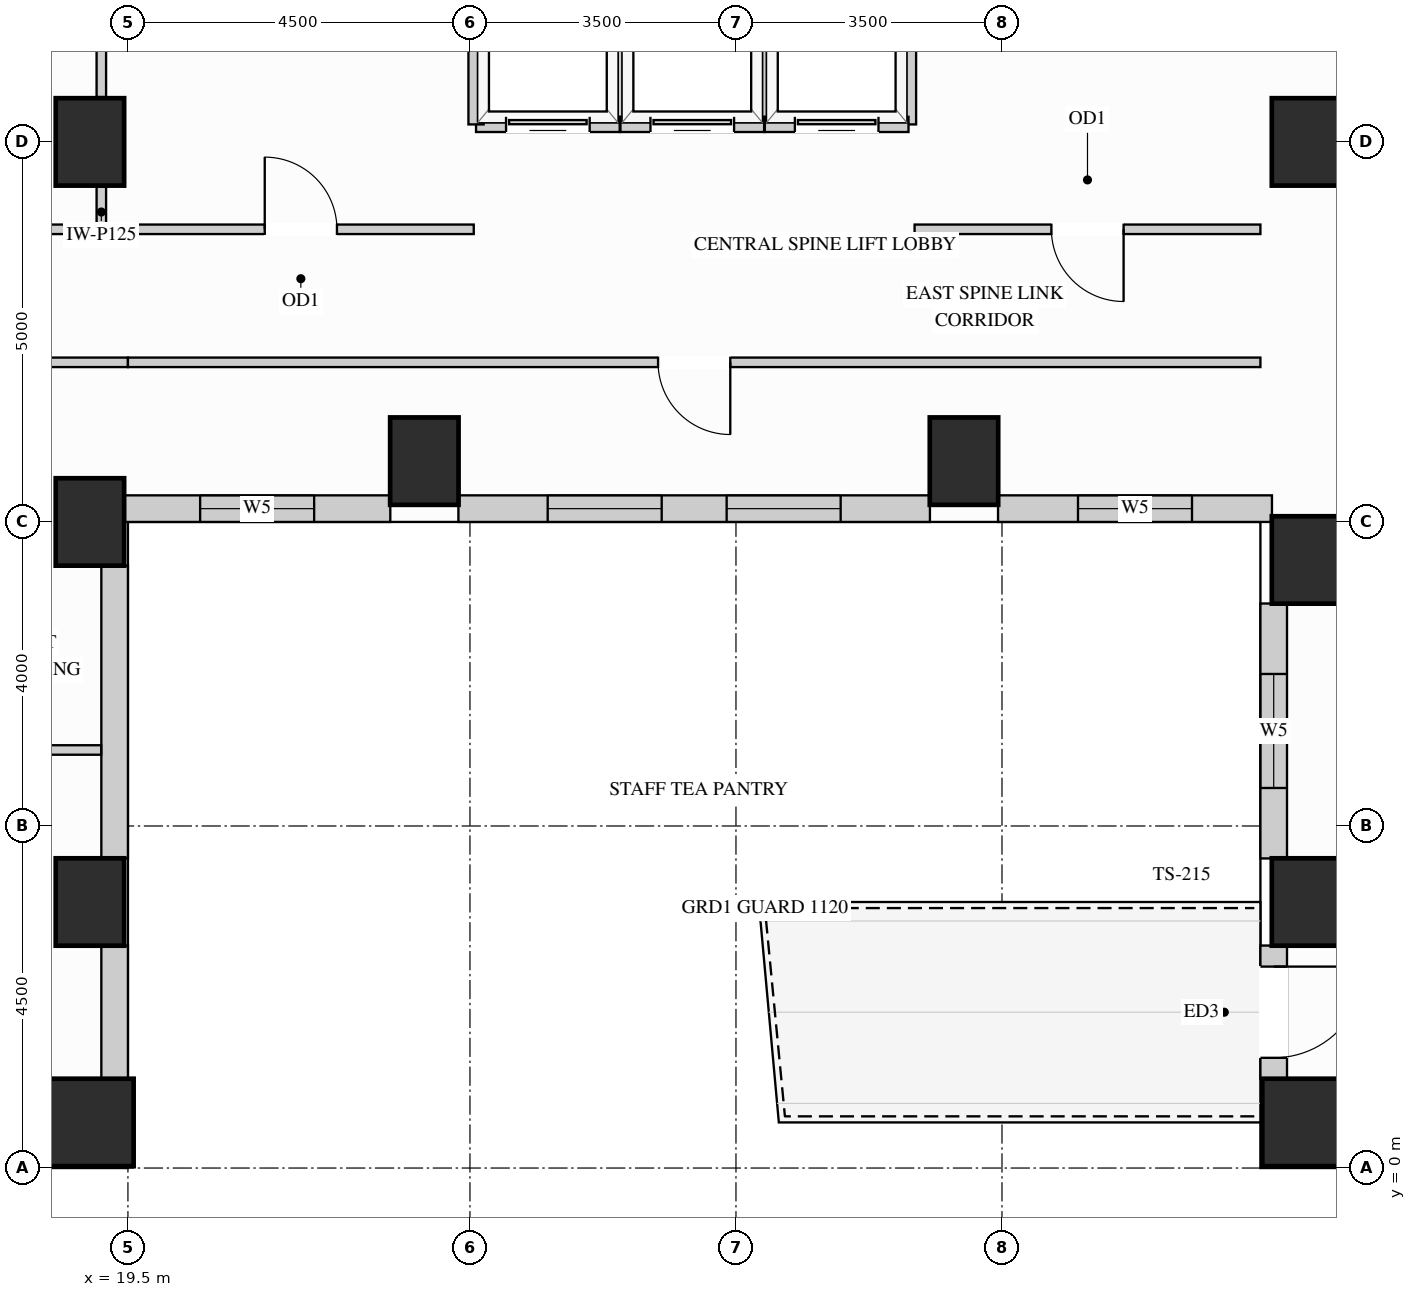
"""IFC4 building model, lengths in metres.
Left out: names, types, materials, properties, quantities, classifications, styles, units other than length and angle.
Written with IfcOpenShell. Run it as: python <this file> out.ifc"""

import sys

from ifc_helpers import new_model, si_unit, direction, frame, frame_2d, origin, origin_2d, place, context, subcontext, project, spatial, rectangle, extrude, source, transform, mapped, element, fill, save


model = new_model("IFC4")
c1 = context("Model", 3, precision=1e-05, world=origin(), true_north=direction((0.0, 1.0)))
c2 = subcontext(c1, "Body", "Model", "MODEL_VIEW")
j1 = project(units=[si_unit("LENGTHUNIT", "METRE"), si_unit("PLANEANGLEUNIT", "RADIAN")], contexts=[c1])
p1 = place(None, origin())
s1 = spatial("IfcSite", under=j1, at=p1, CompositionType="ELEMENT")
p2 = place(p1, origin())
s2 = spatial("IfcBuilding", under=s1, at=p2, CompositionType="ELEMENT")
p3 = place(p2, frame((0.0, 0.0, 106.2)))
s3 = spatial("IfcBuildingStorey", under=s2, at=p3, CompositionType="ELEMENT", Elevation=106.2)
m1 = source(origin(), c2, "Body", "SweptSolid", [
    extrude(rectangle(XDim=0.9, YDim=1.15, at=origin_2d()), origin(), (0.0, 0.0, 1.0), 3.38),
])
for number, where, z_axis, x_axis in (
    (1, (19.0, 13.5, 0.0), (0.0, 0.0, 1.0), (1.0, 0.0, 0.0)),
    (2, (19.0, 3.5, 0.0), (0.0, 0.0, 1.0), (1.0, 0.0, 0.0)),
    (3, (19.0, 8.5, 0.0), (0.0, 0.0, 1.0), (1.0, 0.0, 0.0)),
    (4, (35.0, 13.5, 0.0), (0.0, 0.0, 1.0), (1.0, 0.0, 0.0)),
    (5, (35.0, 3.5, 0.0), (0.0, 0.0, 1.0), (1.0, 0.0, 0.0)),
    (6, (35.0, 8.0, 0.0), (0.0, 0.0, 1.0), (1.0, 0.0, 0.0)),
    (7, (23.4, 9.3, 0.0), (0.0, 0.0, 1.0), (1.0, 0.0, 0.0)),
    (8, (30.5, 9.3, 0.0), (0.0, 0.0, 1.0), (1.0, 0.0, 0.0)),
):
    element("IfcColumn", number, at=place(p3, frame(where, z_axis=z_axis, x_axis=x_axis)), inside=s3, PredefinedType="COLUMN", context=c2, shape_type="MappedRepresentation", body=[
        mapped(m1, transform((0.0, 0.0, 0.0), x_axis=(1.0, 0.0, 0.0), y_axis=(0.0, 1.0, 0.0), z_axis=(0.0, 0.0, 1.0))),
    ])
m2 = source(origin(), c2, "Body", "SweptSolid", [
    extrude(rectangle(XDim=1.15, YDim=1.15, at=origin_2d()), origin(), (0.0, 0.0, 1.0), 3.38),
])
for number, where, z_axis, x_axis in (
    (9, (19.0, 0.6, 0.0), (0.0, 0.0, 1.0), (1.0, 0.0, 0.0)),
    (10, (35.0, 0.6, 0.0), (0.0, 0.0, 1.0), (1.0, 0.0, 0.0)),
):
    element("IfcColumn", number, at=place(p3, frame(where, z_axis=z_axis, x_axis=x_axis)), inside=s3, PredefinedType="COLUMN", context=c2, shape_type="MappedRepresentation", body=[
        mapped(m2, transform((0.0, 0.0, 0.0), x_axis=(1.0, 0.0, 0.0), y_axis=(0.0, 1.0, 0.0), z_axis=(0.0, 0.0, 1.0))),
    ])
m3 = source(origin(), c2, "Body", "SweptSolid", [
    extrude(rectangle(XDim=1.754, YDim=0.35, at=frame_2d((0.877, 0.0))), origin(), (0.0, 0.0, 1.0), 2.519),
])
p4 = place(p3, frame((19.325, 1.173, 0.0), z_axis=(0.0, 0.0, 1.0), x_axis=(0.0, 1.0, 0.0)))
e11 = element("IfcWall", 11, at=p4, inside=s3, PredefinedType="SOLIDWALL", context=c2, shape_type="MappedRepresentation", body=[
    mapped(m3, transform((0.0, 0.0, 0.0), x_axis=(1.0, 0.0, 0.0), y_axis=(0.0, 1.0, 0.0), z_axis=(0.0, 0.0, 1.0))),
])
m4 = source(origin(), c2, "Body", "SweptSolid", [
    extrude(rectangle(XDim=3.854, YDim=0.35, at=frame_2d((1.927, 0.0))), origin(), (0.0, 0.0, 1.0), 2.519),
])
p5 = place(p3, frame((19.325, 4.073, 0.0), z_axis=(0.0, 0.0, 1.0), x_axis=(0.0, 1.0, 0.0)))
e12 = element("IfcWall", 12, at=p5, inside=s3, PredefinedType="SOLIDWALL", context=c2, shape_type="MappedRepresentation", body=[
    mapped(m4, transform((0.0, 0.0, 0.0), x_axis=(1.0, 0.0, 0.0), y_axis=(0.0, 1.0, 0.0), z_axis=(0.0, 0.0, 1.0))),
])
p6 = place(p3, frame((19.448, 8.675, 0.0), z_axis=(0.0, 0.0, 1.0), x_axis=(1.0, 0.0, 0.0)))
e13 = element("IfcWall", 13, at=p6, inside=s3, PredefinedType="SOLIDWALL", context=c2, shape_type="SweptSolid", body=[
    extrude(rectangle(XDim=3.504, YDim=0.35, at=frame_2d((1.752, 0.0))), origin(), (0.0, 0.0, 1.0), 3.365),
])
p7 = place(p6, frame((1.002, 0.0, 0.78)))
e14 = element("IfcOpeningElement", 14, at=p7, cuts=e13, PredefinedType="OPENING", context=c2, shape_type="SweptSolid", body=[
    extrude(rectangle(XDim=1.5, YDim=2.0, at=frame_2d((0.75, 1.0))), frame((0.0, 0.185, 0.0), z_axis=(0.0, -1.0, 0.0), x_axis=(1.0, 0.0, 0.0)), (0.0, 0.0, 1.0), 0.37),
])
p8 = place(p3, frame((23.848, 8.675, 0.0), z_axis=(0.0, 0.0, 1.0), x_axis=(1.0, 0.0, 0.0)))
e15 = element("IfcWall", 15, at=p8, inside=s3, PredefinedType="SOLIDWALL", context=c2, shape_type="SweptSolid", body=[
    extrude(rectangle(XDim=6.204, YDim=0.35, at=frame_2d((3.102, 0.0))), origin(), (0.0, 0.0, 1.0), 3.365),
])
p9 = place(p8, frame((1.175, 0.0, 0.78)))
e16 = element("IfcOpeningElement", 16, at=p9, cuts=e15, PredefinedType="OPENING", context=c2, shape_type="SweptSolid", body=[
    extrude(rectangle(XDim=1.5, YDim=2.0, at=frame_2d((0.75, 1.0))), frame((0.0, 0.185, 0.0), z_axis=(0.0, -1.0, 0.0), x_axis=(1.0, 0.0, 0.0)), (0.0, 0.0, 1.0), 0.37),
])
p10 = place(p8, frame((3.529, 0.0, 0.78)))
e17 = element("IfcOpeningElement", 17, at=p10, cuts=e15, PredefinedType="OPENING", context=c2, shape_type="SweptSolid", body=[
    extrude(rectangle(XDim=1.5, YDim=2.0, at=frame_2d((0.75, 1.0))), frame((0.0, 0.185, 0.0), z_axis=(0.0, -1.0, 0.0), x_axis=(1.0, 0.0, 0.0)), (0.0, 0.0, 1.0), 0.37),
])
p11 = place(p3, frame((30.948, 8.675, 0.0), z_axis=(0.0, 0.0, 1.0), x_axis=(1.0, 0.0, 0.0)))
e18 = element("IfcWall", 18, at=p11, inside=s3, PredefinedType="SOLIDWALL", context=c2, shape_type="SweptSolid", body=[
    extrude(rectangle(XDim=3.604, YDim=0.35, at=frame_2d((1.802, 0.0))), origin(), (0.0, 0.0, 1.0), 3.365),
])
p12 = place(p11, frame((1.052, 0.0, 0.78)))
e19 = element("IfcOpeningElement", 19, at=p12, cuts=e18, PredefinedType="OPENING", context=c2, shape_type="SweptSolid", body=[
    extrude(rectangle(XDim=1.5, YDim=2.0, at=frame_2d((0.75, 1.0))), frame((0.0, 0.185, 0.0), z_axis=(0.0, -1.0, 0.0), x_axis=(1.0, 0.0, 0.0)), (0.0, 0.0, 1.0), 0.37),
])
p13 = place(p3, frame((34.575, 7.427, 0.0), z_axis=(0.0, 0.0, 1.0), x_axis=(0.0, -1.0, 0.0)))
e20 = element("IfcWall", 20, at=p13, inside=s3, PredefinedType="SOLIDWALL", context=c2, shape_type="SweptSolid", body=[
    extrude(rectangle(XDim=3.354, YDim=0.35, at=frame_2d((1.677, 0.0))), origin(), (0.0, 0.0, 1.0), 3.365),
])
p14 = place(p13, frame((0.927, 0.0, 0.78)))
e21 = element("IfcOpeningElement", 21, at=p14, cuts=e20, PredefinedType="OPENING", context=c2, shape_type="SweptSolid", body=[
    extrude(rectangle(XDim=1.5, YDim=2.0, at=frame_2d((0.75, 1.0))), frame((0.0, 0.185, 0.0), z_axis=(0.0, -1.0, 0.0), x_axis=(1.0, 0.0, 0.0)), (0.0, 0.0, 1.0), 0.37),
])
p15 = place(p3, frame((34.575, 2.927, 0.0), z_axis=(0.0, 0.0, 1.0), x_axis=(0.0, -1.0, 0.0)))
e22 = element("IfcWall", 22, at=p15, inside=s3, PredefinedType="SOLIDWALL", context=c2, shape_type="SweptSolid", body=[
    extrude(rectangle(XDim=1.754, YDim=0.35, at=frame_2d((0.877, 0.0))), origin(), (0.0, 0.0, 1.0), 3.365),
])
p16 = place(p15, frame((0.277, 0.0, 0.0)))
e23 = element("IfcOpeningElement", 23, at=p16, cuts=e22, PredefinedType="OPENING", context=c2, shape_type="SweptSolid", body=[
    extrude(rectangle(XDim=1.2, YDim=2.15, at=frame_2d((0.6, 1.075))), frame((0.0, 0.185, 0.0), z_axis=(0.0, -1.0, 0.0), x_axis=(1.0, 0.0, 0.0)), (0.0, 0.0, 1.0), 0.37),
])
m5 = source(origin(), c2, "Body", "SweptSolid", [
    extrude(rectangle(XDim=0.56, YDim=0.125, at=frame_2d((0.28, 0.0))), origin(), (0.0, 0.0, 1.0), 2.677),
])
p17 = place(p3, frame((19.15, 12.35, 0.0), z_axis=(0.0, 0.0, 1.0), x_axis=(0.0, 1.0, 0.0)))
e24 = element("IfcWall", 24, at=p17, inside=s3, PredefinedType="PARTITIONING", context=c2, shape_type="MappedRepresentation", body=[
    mapped(m5, transform((0.0, 0.0, 0.0), x_axis=(1.0, 0.0, 0.0), y_axis=(0.0, 1.0, 0.0), z_axis=(0.0, 0.0, 1.0))),
])
m6 = source(origin(), c2, "Body", "SweptSolid", [
    extrude(rectangle(XDim=3.32, YDim=0.125, at=frame_2d((1.66, 0.0))), origin(), (0.0, 0.0, 1.0), 2.677),
])
p18 = place(p3, frame((19.15, 14.09, 0.0), z_axis=(0.0, 0.0, 1.0), x_axis=(0.0, 1.0, 0.0)))
e25 = element("IfcWall", 25, at=p18, inside=s3, PredefinedType="PARTITIONING", context=c2, shape_type="MappedRepresentation", body=[
    mapped(m6, transform((0.0, 0.0, 0.0), x_axis=(1.0, 0.0, 0.0), y_axis=(0.0, 1.0, 0.0), z_axis=(0.0, 0.0, 1.0))),
])
p19 = place(p3, frame((29.85, 12.35, 0.0), z_axis=(0.0, 0.0, 1.0), x_axis=(1.0, 0.0, 0.0)))
e26 = element("IfcWall", 26, at=p19, inside=s3, PredefinedType="PARTITIONING", context=c2, shape_type="SweptSolid", body=[
    extrude(rectangle(XDim=4.55, YDim=0.125, at=frame_2d((2.275, 0.0))), origin(), (0.0, 0.0, 1.0), 3.365),
])
p20 = place(p19, frame((1.8, 0.0, 0.0)))
e27 = element("IfcOpeningElement", 27, at=p20, cuts=e26, PredefinedType="OPENING", context=c2, shape_type="SweptSolid", body=[
    extrude(rectangle(XDim=0.95, YDim=2.15, at=frame_2d((0.475, 1.075))), frame((0.0, 0.073, 0.0), z_axis=(0.0, -1.0, 0.0), x_axis=(1.0, 0.0, 0.0)), (0.0, 0.0, 1.0), 0.145),
])
m7 = source(origin(), c2, "Body", "SweptSolid", [
    extrude(rectangle(XDim=2.45, YDim=0.125, at=frame_2d((1.225, 0.0))), origin(), (0.0, 0.0, 1.0), 3.365),
])
p21 = place(p3, frame((17.05, 12.35, 0.0), z_axis=(0.0, 0.0, 1.0), x_axis=(1.0, 0.0, 0.0)))
e28 = element("IfcWall", 28, at=p21, inside=s3, PredefinedType="PARTITIONING", context=c2, shape_type="MappedRepresentation", body=[
    mapped(m7, transform((0.0, 0.0, 0.0), x_axis=(1.0, 0.0, 0.0), y_axis=(0.0, 1.0, 0.0), z_axis=(0.0, 0.0, 1.0))),
])
p22 = place(p3, frame((19.5, 12.35, 0.0), z_axis=(0.0, 0.0, 1.0), x_axis=(1.0, 0.0, 0.0)))
e29 = element("IfcWall", 29, at=p22, inside=s3, PredefinedType="PARTITIONING", context=c2, shape_type="SweptSolid", body=[
    extrude(rectangle(XDim=4.55, YDim=0.125, at=frame_2d((2.275, 0.0))), origin(), (0.0, 0.0, 1.0), 3.365),
])
p23 = place(p22, frame((1.8, 0.0, 0.0)))
e30 = element("IfcOpeningElement", 30, at=p23, cuts=e29, PredefinedType="OPENING", context=c2, shape_type="SweptSolid", body=[
    extrude(rectangle(XDim=0.95, YDim=2.15, at=frame_2d((0.475, 1.075))), frame((0.0, 0.073, 0.0), z_axis=(0.0, -1.0, 0.0), x_axis=(1.0, 0.0, 0.0)), (0.0, 0.0, 1.0), 0.145),
])
p24 = place(p3, frame((17.05, 10.6, 0.0), z_axis=(0.0, 0.0, 1.0), x_axis=(1.0, 0.0, 0.0)))
e31 = element("IfcWall", 31, at=p24, inside=s3, PredefinedType="PARTITIONING", context=c2, shape_type="MappedRepresentation", body=[
    mapped(m7, transform((0.0, 0.0, 0.0), x_axis=(1.0, 0.0, 0.0), y_axis=(0.0, 1.0, 0.0), z_axis=(0.0, 0.0, 1.0))),
])
p25 = place(p3, frame((19.5, 10.6, 0.0), z_axis=(0.0, 0.0, 1.0), x_axis=(1.0, 0.0, 0.0)))
e32 = element("IfcWall", 32, at=p25, inside=s3, PredefinedType="PARTITIONING", context=c2, shape_type="SweptSolid", body=[
    extrude(rectangle(XDim=14.9, YDim=0.125, at=frame_2d((7.45, 0.0))), origin(), (0.0, 0.0, 1.0), 3.365),
])
p26 = place(p25, frame((6.975, 0.0, 0.0)))
e33 = element("IfcOpeningElement", 33, at=p26, cuts=e32, PredefinedType="OPENING", context=c2, shape_type="SweptSolid", body=[
    extrude(rectangle(XDim=0.95, YDim=2.15, at=frame_2d((0.475, 1.075))), frame((0.0, 0.073, 0.0), z_axis=(0.0, -1.0, 0.0), x_axis=(1.0, 0.0, 0.0)), (0.0, 0.0, 1.0), 0.145),
])
m8 = source(origin(), c2, "Body", "SweptSolid", [
    extrude(rectangle(XDim=2.098, YDim=0.125, at=frame_2d((1.049, 0.0))), origin(), (0.0, 0.0, 1.0), 3.365),
])
p27 = place(p3, frame((17.05, 5.5, 0.0), z_axis=(0.0, 0.0, 1.0), x_axis=(1.0, 0.0, 0.0)))
e34 = element("IfcWall", 34, at=p27, inside=s3, PredefinedType="PARTITIONING", context=c2, shape_type="MappedRepresentation", body=[
    mapped(m8, transform((0.0, 0.0, 0.0), x_axis=(1.0, 0.0, 0.0), y_axis=(0.0, 1.0, 0.0), z_axis=(0.0, 0.0, 1.0))),
])
m9 = source(origin(), c2, "Body", "SweptSolid", [
    extrude(rectangle(XDim=2.29, YDim=0.2, at=frame_2d((1.145, 0.0))), origin(), (0.0, 0.0, 1.0), 3.365),
])
p28 = place(p3, frame((25.97, 13.73, 0.0), z_axis=(0.0, 0.0, 1.0), x_axis=(0.0, 1.0, 0.0)))
e35 = element("IfcWall", 35, at=p28, inside=s3, PredefinedType="PARTITIONING", context=c2, shape_type="MappedRepresentation", body=[
    mapped(m9, transform((0.0, 0.0, 0.0), x_axis=(1.0, 0.0, 0.0), y_axis=(0.0, 1.0, 0.0), z_axis=(0.0, 0.0, 1.0))),
])
p29 = place(p3, frame((24.08, 13.73, 0.0), z_axis=(0.0, 0.0, 1.0), x_axis=(1.0, 0.0, 0.0)))
e36 = element("IfcWall", 36, at=p29, inside=s3, PredefinedType="PARTITIONING", context=c2, shape_type="SweptSolid", body=[
    extrude(rectangle(XDim=1.89, YDim=0.2, at=frame_2d((0.945, 0.0))), origin(), (0.0, 0.0, 1.0), 2.446),
])
p30 = place(p29, frame((0.395, 0.0, 0.0)))
e37 = element("IfcOpeningElement", 37, at=p30, cuts=e36, PredefinedType="OPENING", context=c2, shape_type="SweptSolid", body=[
    extrude(rectangle(XDim=1.1, YDim=2.2, at=frame_2d((0.55, 1.1))), frame((0.0, 0.11, 0.0), z_axis=(0.0, -1.0, 0.0), x_axis=(1.0, 0.0, 0.0)), (0.0, 0.0, 1.0), 0.22),
])
for number, where, z_axis, x_axis in (
    (38, (24.08, 13.73, 0.0), (0.0, 0.0, 1.0), (0.0, 1.0, 0.0)),
    (39, (27.87, 13.73, 0.0), (0.0, 0.0, 1.0), (0.0, 1.0, 0.0)),
):
    element("IfcWall", number, at=place(p3, frame(where, z_axis=z_axis, x_axis=x_axis)), inside=s3, PredefinedType="PARTITIONING", context=c2, shape_type="MappedRepresentation", body=[
        mapped(m9, transform((0.0, 0.0, 0.0), x_axis=(1.0, 0.0, 0.0), y_axis=(0.0, 1.0, 0.0), z_axis=(0.0, 0.0, 1.0))),
    ])
p31 = place(p3, frame((25.98, 13.73, 0.0), z_axis=(0.0, 0.0, 1.0), x_axis=(1.0, 0.0, 0.0)))
e40 = element("IfcWall", 40, at=p31, inside=s3, PredefinedType="PARTITIONING", context=c2, shape_type="SweptSolid", body=[
    extrude(rectangle(XDim=1.89, YDim=0.2, at=frame_2d((0.945, 0.0))), origin(), (0.0, 0.0, 1.0), 2.446),
])
p32 = place(p31, frame((0.395, 0.0, 0.0)))
e41 = element("IfcOpeningElement", 41, at=p32, cuts=e40, PredefinedType="OPENING", context=c2, shape_type="SweptSolid", body=[
    extrude(rectangle(XDim=1.1, YDim=2.2, at=frame_2d((0.55, 1.1))), frame((0.0, 0.11, 0.0), z_axis=(0.0, -1.0, 0.0), x_axis=(1.0, 0.0, 0.0)), (0.0, 0.0, 1.0), 0.22),
])
p33 = place(p3, frame((29.77, 13.73, 0.0), z_axis=(0.0, 0.0, 1.0), x_axis=(0.0, 1.0, 0.0)))
e42 = element("IfcWall", 42, at=p33, inside=s3, PredefinedType="PARTITIONING", context=c2, shape_type="MappedRepresentation", body=[
    mapped(m9, transform((0.0, 0.0, 0.0), x_axis=(1.0, 0.0, 0.0), y_axis=(0.0, 1.0, 0.0), z_axis=(0.0, 0.0, 1.0))),
])
p34 = place(p3, frame((27.88, 13.73, 0.0), z_axis=(0.0, 0.0, 1.0), x_axis=(1.0, 0.0, 0.0)))
e43 = element("IfcWall", 43, at=p34, inside=s3, PredefinedType="PARTITIONING", context=c2, shape_type="SweptSolid", body=[
    extrude(rectangle(XDim=1.89, YDim=0.2, at=frame_2d((0.945, 0.0))), origin(), (0.0, 0.0, 1.0), 2.446),
])
p35 = place(p34, frame((0.395, 0.0, 0.0)))
e44 = element("IfcOpeningElement", 44, at=p35, cuts=e43, PredefinedType="OPENING", context=c2, shape_type="SweptSolid", body=[
    extrude(rectangle(XDim=1.1, YDim=2.2, at=frame_2d((0.55, 1.1))), frame((0.0, 0.11, 0.0), z_axis=(0.0, -1.0, 0.0), x_axis=(1.0, 0.0, 0.0)), (0.0, 0.0, 1.0), 0.22),
])
m10 = source(origin(), c2, "Body", "SweptSolid", [
    extrude(rectangle(XDim=1.2, YDim=2.15, at=frame_2d((0.6, 1.075))), frame((0.0, 0.025, 0.0), z_axis=(0.0, -1.0, 0.0), x_axis=(1.0, 0.0, 0.0)), (0.0, 0.0, 1.0), 0.05),
])
p36 = place(p16, frame((1.2, 0.0, 0.0), z_axis=(0.0, 0.0, 1.0), x_axis=(-1.0, 0.0, 0.0)))
e45 = element("IfcDoor", 45, at=p36, inside=s3, OperationType="SINGLE_SWING_LEFT", PredefinedType="DOOR", context=c2, shape_type="MappedRepresentation", body=[
    mapped(m10, transform((0.0, 0.0, 0.0), x_axis=(1.0, 0.0, 0.0), y_axis=(0.0, 1.0, 0.0), z_axis=(0.0, 0.0, 1.0))),
])
fill(e23, e45)
m11 = source(origin(), c2, "Body", "SweptSolid", [
    extrude(rectangle(XDim=1.1, YDim=2.2, at=frame_2d((0.55, 1.1))), frame((0.0, 0.025, 0.0), z_axis=(0.0, -1.0, 0.0), x_axis=(1.0, 0.0, 0.0)), (0.0, 0.0, 1.0), 0.05),
])
p37 = place(p30, origin())
e46 = element("IfcDoor", 46, at=p37, inside=s3, OperationType="SLIDING_TO_LEFT", PredefinedType="DOOR", context=c2, shape_type="MappedRepresentation", body=[
    mapped(m11, transform((0.0, 0.0, 0.0), x_axis=(1.0, 0.0, 0.0), y_axis=(0.0, 1.0, 0.0), z_axis=(0.0, 0.0, 1.0))),
])
fill(e37, e46)
p38 = place(p32, origin())
e47 = element("IfcDoor", 47, at=p38, inside=s3, OperationType="SLIDING_TO_LEFT", PredefinedType="DOOR", context=c2, shape_type="MappedRepresentation", body=[
    mapped(m11, transform((0.0, 0.0, 0.0), x_axis=(1.0, 0.0, 0.0), y_axis=(0.0, 1.0, 0.0), z_axis=(0.0, 0.0, 1.0))),
])
fill(e41, e47)
p39 = place(p35, origin())
e48 = element("IfcDoor", 48, at=p39, inside=s3, OperationType="SLIDING_TO_LEFT", PredefinedType="DOOR", context=c2, shape_type="MappedRepresentation", body=[
    mapped(m11, transform((0.0, 0.0, 0.0), x_axis=(1.0, 0.0, 0.0), y_axis=(0.0, 1.0, 0.0), z_axis=(0.0, 0.0, 1.0))),
])
fill(e44, e48)
m12 = source(origin(), c2, "Body", "SweptSolid", [
    extrude(rectangle(XDim=0.95, YDim=2.15, at=frame_2d((0.475, 1.075))), frame((0.0, 0.025, 0.0), z_axis=(0.0, -1.0, 0.0), x_axis=(1.0, 0.0, 0.0)), (0.0, 0.0, 1.0), 0.05),
])
p40 = place(p23, origin())
e49 = element("IfcDoor", 49, at=p40, inside=s3, OperationType="SINGLE_SWING_LEFT", PredefinedType="DOOR", context=c2, shape_type="MappedRepresentation", body=[
    mapped(m12, transform((0.0, 0.0, 0.0), x_axis=(1.0, 0.0, 0.0), y_axis=(0.0, 1.0, 0.0), z_axis=(0.0, 0.0, 1.0))),
])
fill(e30, e49)
p41 = place(p20, origin())
e50 = element("IfcDoor", 50, at=p41, inside=s3, OperationType="SINGLE_SWING_RIGHT", PredefinedType="DOOR", context=c2, shape_type="MappedRepresentation", body=[
    mapped(m12, transform((0.0, 0.0, 0.0), x_axis=(1.0, 0.0, 0.0), y_axis=(0.0, 1.0, 0.0), z_axis=(0.0, 0.0, 1.0))),
])
fill(e27, e50)
p42 = place(p26, origin())
e51 = element("IfcDoor", 51, at=p42, inside=s3, OperationType="SINGLE_SWING_RIGHT", PredefinedType="DOOR", context=c2, shape_type="MappedRepresentation", body=[
    mapped(m12, transform((0.0, 0.0, 0.0), x_axis=(1.0, 0.0, 0.0), y_axis=(0.0, 1.0, 0.0), z_axis=(0.0, 0.0, 1.0))),
])
fill(e33, e51)
m13 = source(origin(), c2, "Body", "SweptSolid", [
    extrude(rectangle(XDim=1.5, YDim=2.0, at=frame_2d((0.75, 1.0))), frame((0.0, 0.03, 0.0), z_axis=(0.0, -1.0, 0.0), x_axis=(1.0, 0.0, 0.0)), (0.0, 0.0, 1.0), 0.06),
])
p43 = place(p7, origin())
e52 = element("IfcWindow", 52, at=p43, inside=s3, PartitioningType="SINGLE_PANEL", PredefinedType="WINDOW", context=c2, shape_type="MappedRepresentation", body=[
    mapped(m13, transform((0.0, 0.0, 0.0), x_axis=(1.0, 0.0, 0.0), y_axis=(0.0, 1.0, 0.0), z_axis=(0.0, 0.0, 1.0))),
])
fill(e14, e52)
p44 = place(p9, origin())
e53 = element("IfcWindow", 53, at=p44, inside=s3, PartitioningType="SINGLE_PANEL", PredefinedType="WINDOW", context=c2, shape_type="MappedRepresentation", body=[
    mapped(m13, transform((0.0, 0.0, 0.0), x_axis=(1.0, 0.0, 0.0), y_axis=(0.0, 1.0, 0.0), z_axis=(0.0, 0.0, 1.0))),
])
fill(e16, e53)
p45 = place(p10, origin())
e54 = element("IfcWindow", 54, at=p45, inside=s3, PartitioningType="SINGLE_PANEL", PredefinedType="WINDOW", context=c2, shape_type="MappedRepresentation", body=[
    mapped(m13, transform((0.0, 0.0, 0.0), x_axis=(1.0, 0.0, 0.0), y_axis=(0.0, 1.0, 0.0), z_axis=(0.0, 0.0, 1.0))),
])
fill(e17, e54)
p46 = place(p12, origin())
e55 = element("IfcWindow", 55, at=p46, inside=s3, PartitioningType="SINGLE_PANEL", PredefinedType="WINDOW", context=c2, shape_type="MappedRepresentation", body=[
    mapped(m13, transform((0.0, 0.0, 0.0), x_axis=(1.0, 0.0, 0.0), y_axis=(0.0, 1.0, 0.0), z_axis=(0.0, 0.0, 1.0))),
])
fill(e19, e55)
p47 = place(p14, origin())
e56 = element("IfcWindow", 56, at=p47, inside=s3, PartitioningType="SINGLE_PANEL", PredefinedType="WINDOW", context=c2, shape_type="MappedRepresentation", body=[
    mapped(m13, transform((0.0, 0.0, 0.0), x_axis=(1.0, 0.0, 0.0), y_axis=(0.0, 1.0, 0.0), z_axis=(0.0, 0.0, 1.0))),
])
fill(e21, e56)
save(model, sys.argv[1])
